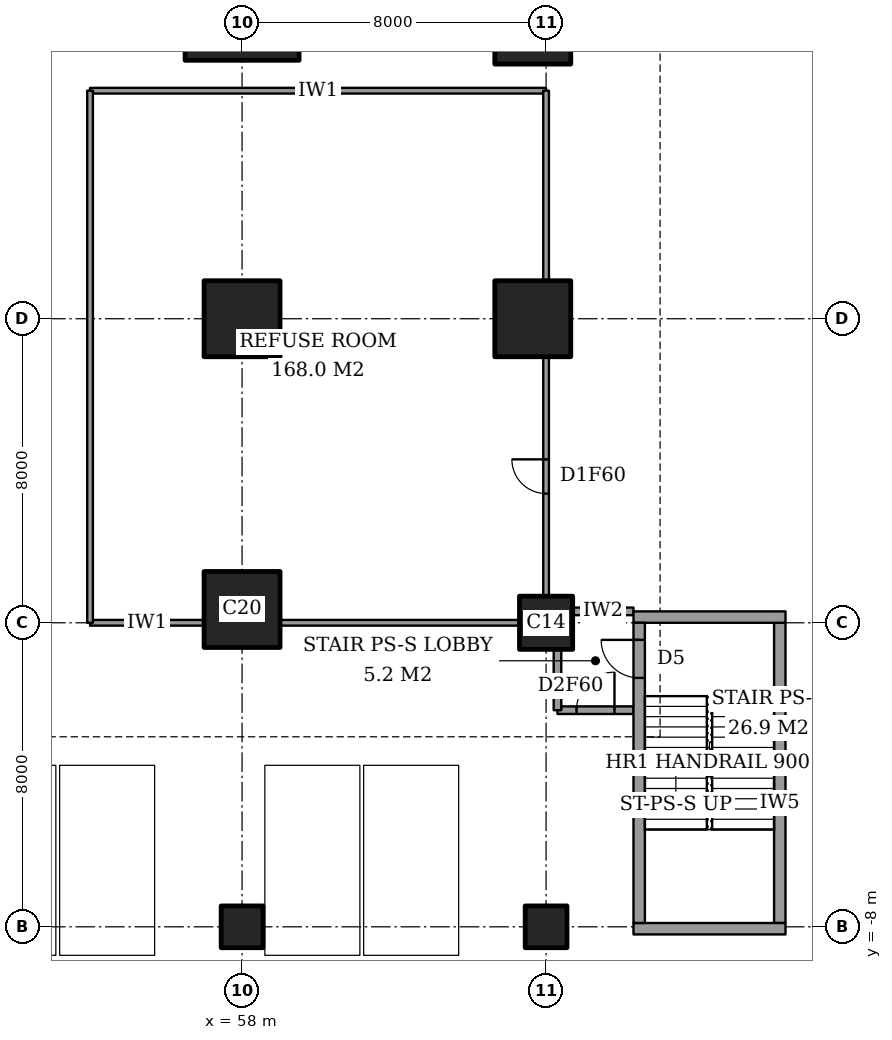
"""IFC4 building model, lengths in metres.
Left out: names, types, materials, properties, quantities, classifications, styles, units other than length and angle.
Written with IfcOpenShell. Run it as: python <this file> out.ifc"""

import sys

from ifc_helpers import new_model, si_unit, direction, frame, frame_2d, origin, origin_2d, place, context, subcontext, project, spatial, rectangle, extrude, element, fill, save


model = new_model("IFC4")
c1 = context("Model", 3, precision=1e-05, world=origin(), true_north=direction((0.0, 1.0)))
c2 = subcontext(c1, "Body", "Model", "MODEL_VIEW")
j1 = project(units=[si_unit("LENGTHUNIT", "METRE"), si_unit("PLANEANGLEUNIT", "RADIAN")], contexts=[c1])
p1 = place(None, origin())
s1 = spatial("IfcSite", under=j1, at=p1, CompositionType="ELEMENT")
p2 = place(p1, origin())
s2 = spatial("IfcBuilding", under=s1, at=p2, CompositionType="ELEMENT")
p3 = place(p2, frame((0.0, 0.0, -5.0)))
s3 = spatial("IfcBuildingStorey", under=s2, at=p3, CompositionType="ELEMENT", Elevation=-5.0)
p4 = place(p3, frame((58.0, -8.0, -0.4), z_axis=(0.0, 0.0, 1.0), x_axis=(1.0, 0.0, 0.0)))
e1 = element("IfcColumn", 1, at=p4, inside=s3, PredefinedType="COLUMN", context=c2, shape_type="SweptSolid", body=[
    extrude(rectangle(XDim=1.1, YDim=1.1, at=origin_2d()), origin(), (0.0, 0.0, 1.0), 5.4),
])
for number, where, z_axis, x_axis in (
    (2, (58.0, 0.35, 0.0), (0.0, 0.0, 1.0), (1.0, 0.0, 0.0)),
    (3, (58.0, 8.0, 0.0), (0.0, 0.0, 1.0), (1.0, 0.0, 0.0)),
):
    element("IfcColumn", number, at=place(p3, frame(where, z_axis=z_axis, x_axis=x_axis)), inside=s3, PredefinedType="COLUMN", context=c2, shape_type="SweptSolid", body=[
        extrude(rectangle(XDim=2.0, YDim=2.0, at=origin_2d()), origin(), (0.0, 0.0, 1.0), 5.0),
    ])
p5 = place(p3, frame((58.0, 16.0, 0.0), z_axis=(0.0, 0.0, 1.0), x_axis=(1.0, 0.0, 0.0)))
e4 = element("IfcColumn", 4, at=p5, inside=s3, PredefinedType="COLUMN", context=c2, shape_type="SweptSolid", body=[
    extrude(rectangle(XDim=3.0, YDim=2.4, at=origin_2d()), origin(), (0.0, 0.0, 1.0), 5.0),
])
p6 = place(p3, frame((66.0, -8.0, -0.4), z_axis=(0.0, 0.0, 1.0), x_axis=(1.0, 0.0, 0.0)))
e5 = element("IfcColumn", 5, at=p6, inside=s3, PredefinedType="COLUMN", context=c2, shape_type="SweptSolid", body=[
    extrude(rectangle(XDim=1.1, YDim=1.1, at=origin_2d()), origin(), (0.0, 0.0, 1.0), 5.4),
])
p7 = place(p3, frame((66.0, 0.0, 0.0), z_axis=(0.0, 0.0, 1.0), x_axis=(1.0, 0.0, 0.0)))
e6 = element("IfcColumn", 6, at=p7, inside=s3, PredefinedType="COLUMN", context=c2, shape_type="SweptSolid", body=[
    extrude(rectangle(XDim=1.4, YDim=1.4, at=origin_2d()), origin(), (0.0, 0.0, 1.0), 5.0),
])
p8 = place(p3, frame((65.65, 8.0, 0.0), z_axis=(0.0, 0.0, 1.0), x_axis=(1.0, 0.0, 0.0)))
e7 = element("IfcColumn", 7, at=p8, inside=s3, PredefinedType="COLUMN", context=c2, shape_type="SweptSolid", body=[
    extrude(rectangle(XDim=2.0, YDim=2.0, at=origin_2d()), origin(), (0.0, 0.0, 1.0), 5.0),
])
p9 = place(p3, frame((65.65, 16.0, 0.0), z_axis=(0.0, 0.0, 1.0), x_axis=(0.0, 1.0, 0.0)))
e8 = element("IfcColumn", 8, at=p9, inside=s3, PredefinedType="COLUMN", context=c2, shape_type="SweptSolid", body=[
    extrude(rectangle(XDim=2.6, YDim=2.0, at=origin_2d()), origin(), (0.0, 0.0, 1.0), 5.0),
])
p10 = place(p3, frame((66.3, -2.3, 0.0), z_axis=(0.0, 0.0, 1.0), x_axis=(1.0, 0.0, 0.0)))
e9 = element("IfcWall", 9, at=p10, inside=s3, PredefinedType="PARTITIONING", context=c2, shape_type="SweptSolid", body=[
    extrude(rectangle(XDim=2.0, YDim=0.2, at=frame_2d((1.0, 0.0))), origin(), (0.0, 0.0, 1.0), 4.7),
])
p11 = place(p10, frame((0.5, 0.0, 0.0)))
e10 = element("IfcOpeningElement", 10, at=p11, cuts=e9, PredefinedType="OPENING", context=c2, shape_type="SweptSolid", body=[
    extrude(rectangle(XDim=1.0, YDim=2.1, at=frame_2d((0.5, 1.05))), frame((0.0, 0.11, 0.0), z_axis=(0.0, -1.0, 0.0), x_axis=(1.0, 0.0, 0.0)), (0.0, 0.0, 1.0), 0.22),
])
p12 = place(p3, frame((54.0, 0.0, 0.0), z_axis=(0.0, 0.0, 1.0), x_axis=(1.0, 0.0, 0.0)))
e11 = element("IfcWall", 11, at=p12, inside=s3, PredefinedType="PARTITIONING", context=c2, shape_type="SweptSolid", body=[
    extrude(rectangle(XDim=3.0, YDim=0.15, at=frame_2d((1.5, 0.0))), origin(), (0.0, 0.0, 1.0), 3.3),
])
p13 = place(p3, frame((59.0, 0.0, 0.0), z_axis=(0.0, 0.0, 1.0), x_axis=(1.0, 0.0, 0.0)))
e12 = element("IfcWall", 12, at=p13, inside=s3, PredefinedType="PARTITIONING", context=c2, shape_type="SweptSolid", body=[
    extrude(rectangle(XDim=6.3, YDim=0.15, at=frame_2d((3.15, 0.0))), origin(), (0.0, 0.0, 1.0), 3.3),
])
p14 = place(p3, frame((66.7, 0.3, 0.0), z_axis=(0.0, 0.0, 1.0), x_axis=(1.0, 0.0, 0.0)))
e13 = element("IfcWall", 13, at=p14, inside=s3, PredefinedType="PARTITIONING", context=c2, shape_type="SweptSolid", body=[
    extrude(rectangle(XDim=1.6, YDim=0.2, at=frame_2d((0.8, 0.0))), origin(), (0.0, 0.0, 1.0), 4.7),
])
p15 = place(p3, frame((54.0, 14.0, 0.0), z_axis=(0.0, 0.0, 1.0), x_axis=(1.0, 0.0, 0.0)))
e14 = element("IfcWall", 14, at=p15, inside=s3, PredefinedType="PARTITIONING", context=c2, shape_type="SweptSolid", body=[
    extrude(rectangle(XDim=12.0, YDim=0.15, at=frame_2d((6.0, 0.0))), origin(), (0.0, 0.0, 1.0), 4.7),
])
p16 = place(p3, frame((54.0, 0.0, 0.0), z_axis=(0.0, 0.0, 1.0), x_axis=(0.0, 1.0, 0.0)))
e15 = element("IfcWall", 15, at=p16, inside=s3, PredefinedType="PARTITIONING", context=c2, shape_type="SweptSolid", body=[
    extrude(rectangle(XDim=14.0, YDim=0.15, at=frame_2d((7.0, 0.0))), origin(), (0.0, 0.0, 1.0), 4.7),
])
p17 = place(p3, frame((66.0, 0.7, 0.0), z_axis=(0.0, 0.0, 1.0), x_axis=(0.0, 1.0, 0.0)))
e16 = element("IfcWall", 16, at=p17, inside=s3, PredefinedType="PARTITIONING", context=c2, shape_type="SweptSolid", body=[
    extrude(rectangle(XDim=6.3, YDim=0.15, at=frame_2d((3.15, 0.0))), origin(), (0.0, 0.0, 1.0), 3.3),
])
p18 = place(p17, frame((2.7, 0.0, 0.0)))
e17 = element("IfcOpeningElement", 17, at=p18, cuts=e16, PredefinedType="OPENING", context=c2, shape_type="SweptSolid", body=[
    extrude(rectangle(XDim=0.9, YDim=2.1, at=frame_2d((0.45, 1.05))), frame((0.0, 0.085, 0.0), z_axis=(0.0, -1.0, 0.0), x_axis=(1.0, 0.0, 0.0)), (0.0, 0.0, 1.0), 0.17),
])
p19 = place(p3, frame((66.0, 9.0, 0.0), z_axis=(0.0, 0.0, 1.0), x_axis=(0.0, 1.0, 0.0)))
e18 = element("IfcWall", 18, at=p19, inside=s3, PredefinedType="PARTITIONING", context=c2, shape_type="SweptSolid", body=[
    extrude(rectangle(XDim=5.0, YDim=0.15, at=frame_2d((2.5, 0.0))), origin(), (0.0, 0.0, 1.0), 3.3),
])
p20 = place(p3, frame((66.3, -2.3, 0.0), z_axis=(0.0, 0.0, 1.0), x_axis=(0.0, 1.0, 0.0)))
e19 = element("IfcWall", 19, at=p20, inside=s3, PredefinedType="PARTITIONING", context=c2, shape_type="SweptSolid", body=[
    extrude(rectangle(XDim=1.6, YDim=0.2, at=frame_2d((0.8, 0.0))), origin(), (0.0, 0.0, 1.0), 3.3),
])
for number, where, z_axis, x_axis in (
    (20, (68.3, -8.05, 0.0), (0.0, 0.0, 1.0), (1.0, 0.0, 0.0)),
    (21, (68.3, 0.15, 0.0), (0.0, 0.0, 1.0), (1.0, 0.0, 0.0)),
):
    element("IfcWall", number, at=place(p3, frame(where, z_axis=z_axis, x_axis=x_axis)), inside=s3, PredefinedType="PARTITIONING", context=c2, shape_type="SweptSolid", body=[
        extrude(rectangle(XDim=4.0, YDim=0.3, at=frame_2d((2.0, 0.0))), origin(), (0.0, 0.0, 1.0), 5.0),
    ])
p21 = place(p3, frame((68.45, -7.9, 0.0), z_axis=(0.0, 0.0, 1.0), x_axis=(0.0, 1.0, 0.0)))
e22 = element("IfcWall", 22, at=p21, inside=s3, PredefinedType="PARTITIONING", context=c2, shape_type="SweptSolid", body=[
    extrude(rectangle(XDim=7.9, YDim=0.3, at=frame_2d((3.95, 0.0))), origin(), (0.0, 0.0, 1.0), 5.0),
])
p22 = place(p21, frame((6.45, 0.0, 0.0)))
e23 = element("IfcOpeningElement", 23, at=p22, cuts=e22, PredefinedType="OPENING", context=c2, shape_type="SweptSolid", body=[
    extrude(rectangle(XDim=1.0, YDim=2.1, at=frame_2d((0.5, 1.05))), frame((0.0, 0.16, 0.0), z_axis=(0.0, -1.0, 0.0), x_axis=(1.0, 0.0, 0.0)), (0.0, 0.0, 1.0), 0.32),
])
p23 = place(p3, frame((72.15, -7.9, 0.0), z_axis=(0.0, 0.0, 1.0), x_axis=(0.0, 1.0, 0.0)))
e24 = element("IfcWall", 24, at=p23, inside=s3, PredefinedType="PARTITIONING", context=c2, shape_type="SweptSolid", body=[
    extrude(rectangle(XDim=7.9, YDim=0.3, at=frame_2d((3.95, 0.0))), origin(), (0.0, 0.0, 1.0), 5.0),
])
p24 = place(p18, origin())
e25 = element("IfcDoor", 25, at=p24, inside=s3, OperationType="SINGLE_SWING_LEFT", PredefinedType="DOOR", context=c2, shape_type="SweptSolid", body=[
    extrude(rectangle(XDim=0.9, YDim=2.1, at=frame_2d((0.45, 1.05))), frame((0.0, 0.025, 0.0), z_axis=(0.0, -1.0, 0.0), x_axis=(1.0, 0.0, 0.0)), (0.0, 0.0, 1.0), 0.05),
])
fill(e17, e25)
p25 = place(p11, origin())
e26 = element("IfcDoor", 26, at=p25, inside=s3, OperationType="SINGLE_SWING_LEFT", PredefinedType="DOOR", context=c2, shape_type="SweptSolid", body=[
    extrude(rectangle(XDim=1.0, YDim=2.1, at=frame_2d((0.5, 1.05))), frame((0.0, 0.025, 0.0), z_axis=(0.0, -1.0, 0.0), x_axis=(1.0, 0.0, 0.0)), (0.0, 0.0, 1.0), 0.05),
])
fill(e10, e26)
p26 = place(p22, origin())
e27 = element("IfcDoor", 27, at=p26, inside=s3, OperationType="SINGLE_SWING_LEFT", PredefinedType="DOOR", context=c2, shape_type="SweptSolid", body=[
    extrude(rectangle(XDim=1.0, YDim=2.1, at=frame_2d((0.5, 1.05))), frame((0.0, 0.025, 0.0), z_axis=(0.0, -1.0, 0.0), x_axis=(1.0, 0.0, 0.0)), (0.0, 0.0, 1.0), 0.05),
])
fill(e23, e27)
save(model, sys.argv[1])
